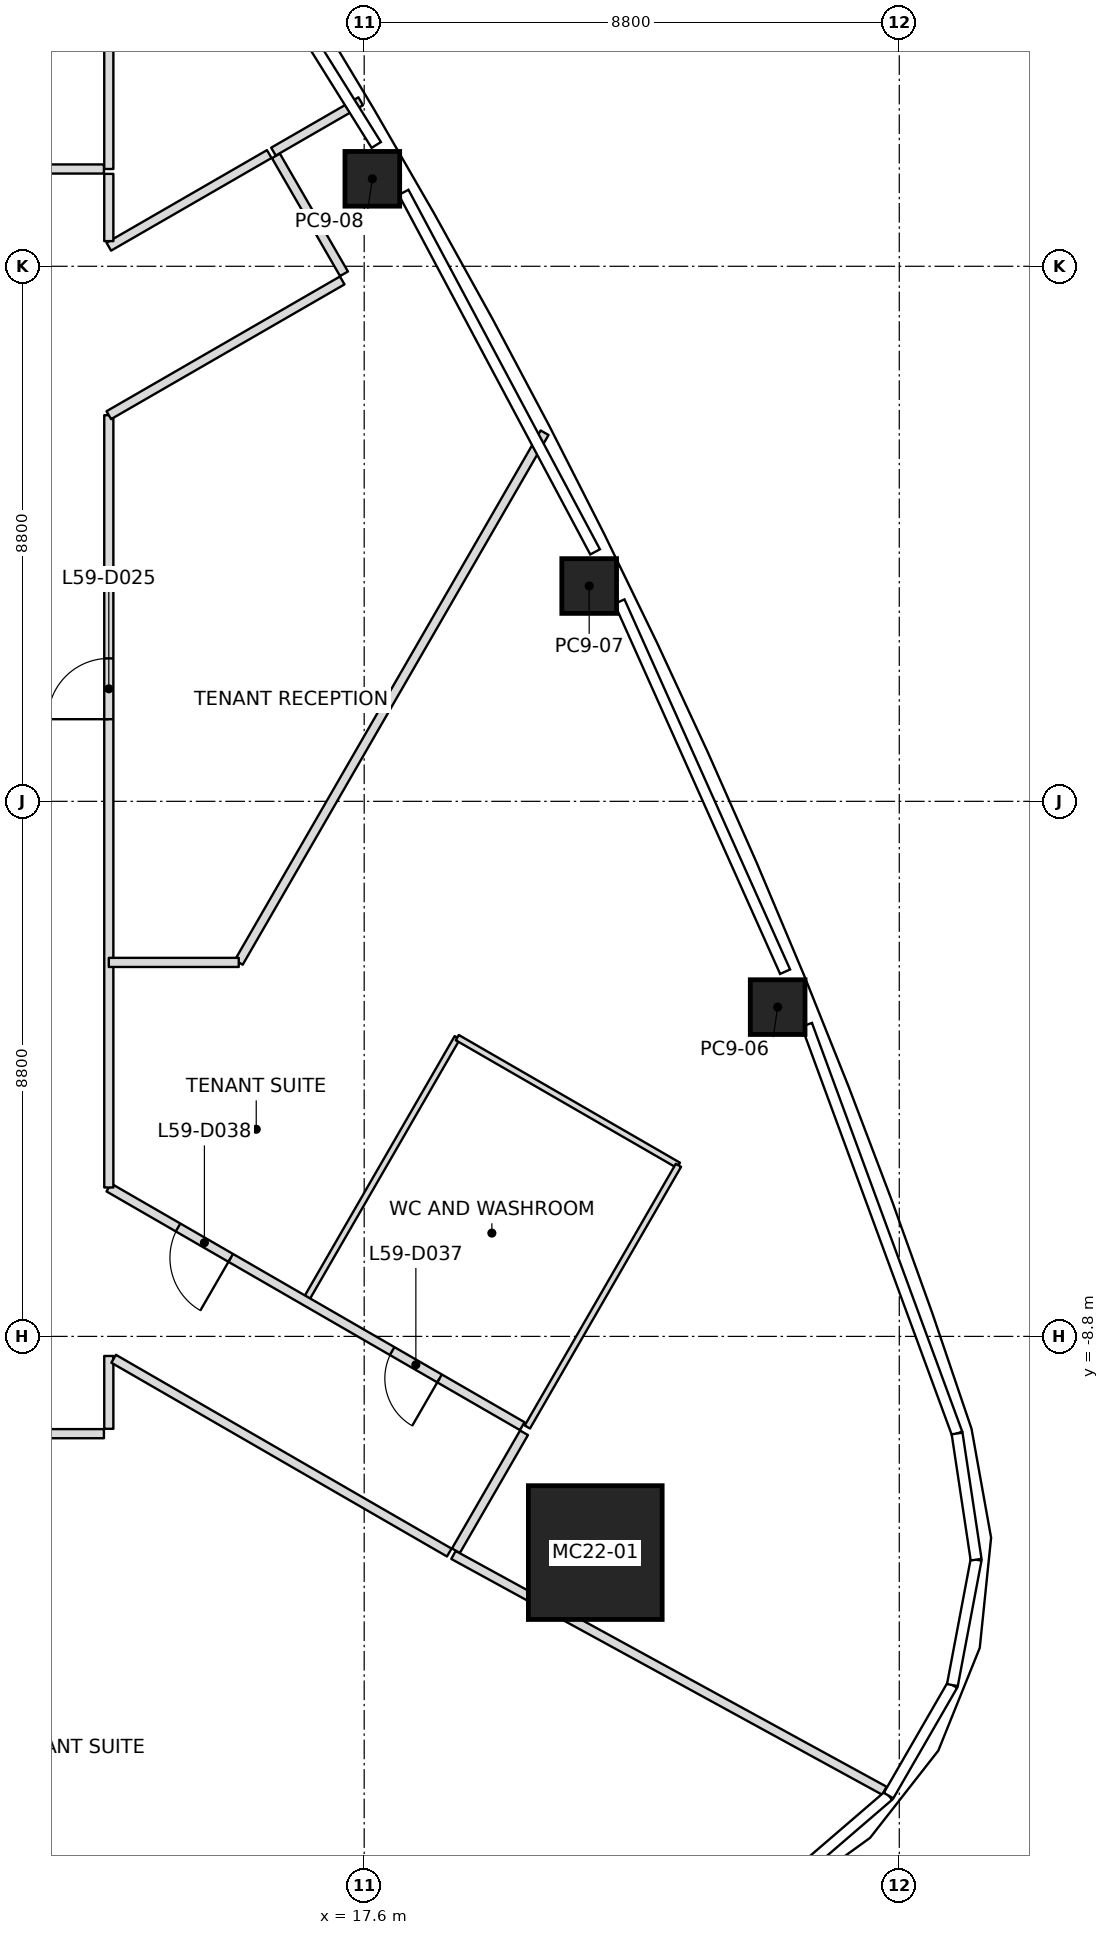
"""IFC4 building model, lengths in metres.
Left out: names, types, materials, properties, quantities, classifications, styles, units other than length and angle.
Written with IfcOpenShell. Run it as: python <this file> out.ifc"""

import sys

from ifc_helpers import new_model, si_unit, direction, frame, frame_2d, origin, origin_2d, place, context, subcontext, project, spatial, rectangle, extrude, element, fill, save


model = new_model("IFC4")
c1 = context("Model", 3, precision=1e-05, world=origin(), true_north=direction((0.0, 1.0)))
c2 = subcontext(c1, "Body", "Model", "MODEL_VIEW")
j1 = project(units=[si_unit("LENGTHUNIT", "METRE"), si_unit("PLANEANGLEUNIT", "RADIAN")], contexts=[c1])
p1 = place(None, origin())
s1 = spatial("IfcSite", under=j1, at=p1, CompositionType="ELEMENT")
p2 = place(p1, origin())
s2 = spatial("IfcBuilding", under=s1, at=p2, CompositionType="ELEMENT")
p3 = place(p2, frame((0.0, 0.0, 263.0)))
s3 = spatial("IfcBuildingStorey", under=s2, at=p3, CompositionType="ELEMENT", Elevation=263.0)
p4 = place(p3, frame((21.4, -12.356, 0.0), z_axis=(-0.027756693063, 0.016104982348, 0.999484965136), x_axis=(0.99961470877, 0.000447193351, 0.02775309042)))
e1 = element("IfcColumn", 1, at=p4, inside=s3, PredefinedType="COLUMN", context=c2, shape_type="SweptSolid", body=[
    extrude(rectangle(XDim=2.2, YDim=2.2, at=origin_2d()), origin(), (0.0, 0.0, 1.0), 4.002),
])
p5 = place(p3, frame((24.4, -3.385, 0.0), z_axis=(-0.017757540332, 0.01000768596, 0.999792236409), x_axis=(-0.376945742216, 0.926097740454, -0.015965041529)))
e2 = element("IfcColumn", 2, at=p5, inside=s3, PredefinedType="COLUMN", context=c2, shape_type="SweptSolid", body=[
    extrude(rectangle(XDim=0.9, YDim=0.9, at=origin_2d()), origin(), (0.0, 0.0, 1.0), 4.001),
])
p6 = place(p3, frame((21.3, 3.541, 0.0), z_axis=(-0.014036674448, 0.002013957638, 0.999899452818), x_axis=(-0.439491445478, 0.898211338571, -0.00797876017)))
e3 = element("IfcColumn", 3, at=p6, inside=s3, PredefinedType="COLUMN", context=c2, shape_type="SweptSolid", body=[
    extrude(rectangle(XDim=0.9, YDim=0.9, at=origin_2d()), origin(), (0.0, 0.0, 1.0), 4.0),
])
p7 = place(p3, frame((17.734, 10.239, 0.0), z_axis=(-0.009887052741, -0.005675900648, 0.999935013058), x_axis=(-0.49997556095, 0.866039512773, -2.7732311e-05)))
e4 = element("IfcColumn", 4, at=p7, inside=s3, PredefinedType="COLUMN", context=c2, shape_type="SweptSolid", body=[
    extrude(rectangle(XDim=0.9, YDim=0.9, at=origin_2d()), origin(), (0.0, 0.0, 1.0), 4.0),
])
p8 = place(p3, frame((13.4, 13.711, 0.0), z_axis=(0.0, 0.0, 1.0), x_axis=(0.0, -1.0, 0.0)))
e5 = element("IfcWall", 5, at=p8, inside=s3, PredefinedType="PARTITIONING", context=c2, shape_type="SweptSolid", body=[
    extrude(rectangle(XDim=3.311, YDim=0.15, at=frame_2d((1.656, 0.0))), origin(), (0.0, 0.0, 1.0), 3.443),
])
p9 = place(p3, frame((20.567, 6.062, 0.0), z_axis=(0.0, 0.0, 1.0), x_axis=(-0.500007469231, -0.866021091379, 0.0)))
e6 = element("IfcWall", 6, at=p9, inside=s3, PredefinedType="PARTITIONING", context=c2, shape_type="SweptSolid", body=[
    extrude(rectangle(XDim=10.059, YDim=0.15, at=frame_2d((5.03, 0.0))), origin(), (0.0, 0.0, 1.0), 3.234),
])
p10 = place(p3, frame((15.537, -2.649, 0.0), z_axis=(0.0, 0.0, 1.0), x_axis=(-1.0, 0.0, 0.0)))
e7 = element("IfcWall", 7, at=p10, inside=s3, PredefinedType="PARTITIONING", context=c2, shape_type="SweptSolid", body=[
    extrude(rectangle(XDim=2.137, YDim=0.15, at=frame_2d((1.069, 0.0))), origin(), (0.0, 0.0, 1.0), 3.317),
])
p11 = place(p3, frame((16.108, 10.686, 0.0), z_axis=(0.0, 0.0, 1.0), x_axis=(0.866057962423, 0.499943602543, 0.0)))
e8 = element("IfcWall", 8, at=p11, inside=s3, PredefinedType="PARTITIONING", context=c2, shape_type="SweptSolid", body=[
    extrude(rectangle(XDim=1.656, YDim=0.15, at=frame_2d((0.828, 0.0))), origin(), (0.0, 0.0, 1.0), 3.234),
])
p12 = place(p3, frame((19.068, -12.395, 0.0), z_axis=(0.0, 0.0, 1.0), x_axis=(0.877283852565, -0.479971917959, 0.0)))
e9 = element("IfcWall", 9, at=p12, inside=s3, PredefinedType="PARTITIONING", context=c2, shape_type="SweptSolid", body=[
    extrude(rectangle(XDim=8.078, YDim=0.15, at=frame_2d((4.039, 0.0))), origin(), (0.0, 0.0, 1.0), 3.234),
])
p13 = place(p3, frame((1.2, -10.4, 0.0), z_axis=(0.0, 0.0, 1.0), x_axis=(1.0, 0.0, 0.0)))
e10 = element("IfcWall", 10, at=p13, inside=s3, PredefinedType="PARTITIONING", context=c2, shape_type="SweptSolid", body=[
    extrude(rectangle(XDim=12.12, YDim=0.15, at=frame_2d((6.06, 0.0))), origin(), (0.0, 0.0, 1.0), 3.317),
])
p14 = place(p13, frame((1.35, 0.0, 0.0)))
e11 = element("IfcOpeningElement", 11, at=p14, cuts=e10, PredefinedType="OPENING", context=c2, shape_type="SweptSolid", body=[
    extrude(rectangle(XDim=0.9, YDim=2.1, at=frame_2d((0.45, 1.05))), frame((0.0, 0.075, 0.0), z_axis=(0.0, -1.0, 0.0), x_axis=(1.0, 0.0, 0.0)), (0.0, 0.0, 1.0), 0.15),
])
p15 = place(p13, frame((7.45, 0.0, 0.0)))
e12 = element("IfcOpeningElement", 12, at=p15, cuts=e10, PredefinedType="OPENING", context=c2, shape_type="SweptSolid", body=[
    extrude(rectangle(XDim=1.0, YDim=2.1, at=frame_2d((0.5, 1.05))), frame((0.0, 0.075, 0.0), z_axis=(0.0, -1.0, 0.0), x_axis=(1.0, 0.0, 0.0)), (0.0, 0.0, 1.0), 0.15),
])
p16 = place(p3, frame((13.32, 10.4, 0.0), z_axis=(0.0, 0.0, 1.0), x_axis=(-1.0, 0.0, 0.0)))
e13 = element("IfcWall", 13, at=p16, inside=s3, PredefinedType="PARTITIONING", context=c2, shape_type="SweptSolid", body=[
    extrude(rectangle(XDim=12.12, YDim=0.15, at=frame_2d((6.06, 0.0))), origin(), (0.0, 0.0, 1.0), 3.443),
])
p17 = place(p16, frame((5.52, 0.0, 0.0)))
e14 = element("IfcOpeningElement", 14, at=p17, cuts=e13, PredefinedType="OPENING", context=c2, shape_type="SweptSolid", body=[
    extrude(rectangle(XDim=1.0, YDim=2.1, at=frame_2d((0.5, 1.05))), frame((0.0, 0.075, 0.0), z_axis=(0.0, -1.0, 0.0), x_axis=(1.0, 0.0, 0.0)), (0.0, 0.0, 1.0), 0.15),
])
p18 = place(p3, frame((13.4, -10.32, 0.0), z_axis=(0.0, 0.0, 1.0), x_axis=(0.0, 1.0, 0.0)))
e15 = element("IfcWall", 15, at=p18, inside=s3, PredefinedType="PARTITIONING", context=c2, shape_type="SweptSolid", body=[
    extrude(rectangle(XDim=1.198, YDim=0.15, at=frame_2d((0.599, 0.0))), origin(), (0.0, 0.0, 1.0), 3.233),
])
p19 = place(p3, frame((13.479, -9.168, 0.0), z_axis=(0.0, 0.0, 1.0), x_axis=(0.866030582615, -0.499991029894, 0.0)))
e16 = element("IfcWall", 16, at=p19, inside=s3, PredefinedType="PARTITIONING", context=c2, shape_type="SweptSolid", body=[
    extrude(rectangle(XDim=6.374, YDim=0.15, at=frame_2d((3.187, 0.0))), origin(), (0.0, 0.0, 1.0), 3.233),
])
p20 = place(p3, frame((16.039, 10.646, 0.0), z_axis=(0.0, 0.0, 1.0), x_axis=(-0.866045493049, -0.499965202759, 0.0)))
e17 = element("IfcWall", 17, at=p20, inside=s3, PredefinedType="PARTITIONING", context=c2, shape_type="SweptSolid", body=[
    extrude(rectangle(XDim=3.047, YDim=0.15, at=frame_2d((1.523, 0.0))), origin(), (0.0, 0.0, 1.0), 3.45),
])
p21 = place(p3, frame((13.4, 9.214, 0.0), z_axis=(0.0, 0.0, 1.0), x_axis=(0.0, 1.0, 0.0)))
e18 = element("IfcWall", 18, at=p21, inside=s3, PredefinedType="PARTITIONING", context=c2, shape_type="SweptSolid", body=[
    extrude(rectangle(XDim=1.106, YDim=0.15, at=frame_2d((0.553, 0.0))), origin(), (0.0, 0.0, 1.0), 3.45),
])
p22 = place(p3, frame((17.268, 8.677, 0.0), z_axis=(0.0, 0.0, 1.0), x_axis=(-0.500077830873, 0.865980463445, 0.0)))
e19 = element("IfcWall", 19, at=p22, inside=s3, PredefinedType="PARTITIONING", context=c2, shape_type="SweptSolid", body=[
    extrude(rectangle(XDim=2.24, YDim=0.15, at=frame_2d((1.12, 0.0))), origin(), (0.0, 0.0, 1.0), 3.45),
])
p23 = place(p3, frame((20.199, -10.276, 0.0), z_axis=(0.0, 0.0, 1.0), x_axis=(-0.866028164062, 0.499995219029, 0.0)))
e20 = element("IfcWall", 20, at=p23, inside=s3, PredefinedType="PARTITIONING", context=c2, shape_type="SweptSolid", body=[
    extrude(rectangle(XDim=7.851, YDim=0.15, at=frame_2d((3.926, 0.0))), origin(), (0.0, 0.0, 1.0), 3.317),
])
p24 = place(p23, frame((1.57, 0.0, 0.0)))
e21 = element("IfcOpeningElement", 21, at=p24, cuts=e20, PredefinedType="OPENING", context=c2, shape_type="SweptSolid", body=[
    extrude(rectangle(XDim=0.9, YDim=2.1, at=frame_2d((0.45, 1.05))), frame((0.0, 0.075, 0.0), z_axis=(0.0, -1.0, 0.0), x_axis=(1.0, 0.0, 0.0)), (0.0, 0.0, 1.0), 0.15),
])
p25 = place(p23, frame((5.535, 0.0, 0.0)))
e22 = element("IfcOpeningElement", 22, at=p25, cuts=e20, PredefinedType="OPENING", context=c2, shape_type="SweptSolid", body=[
    extrude(rectangle(XDim=1.0, YDim=2.1, at=frame_2d((0.5, 1.05))), frame((0.0, 0.075, 0.0), z_axis=(0.0, -1.0, 0.0), x_axis=(1.0, 0.0, 0.0)), (0.0, 0.0, 1.0), 0.15),
])
p26 = place(p3, frame((13.4, -6.351, 0.0), z_axis=(0.0, 0.0, 1.0), x_axis=(0.0, 1.0, 0.0)))
e23 = element("IfcWall", 23, at=p26, inside=s3, PredefinedType="PARTITIONING", context=c2, shape_type="SweptSolid", body=[
    extrude(rectangle(XDim=12.702, YDim=0.15, at=frame_2d((6.351, 0.0))), origin(), (0.0, 0.0, 1.0), 3.317),
])
p27 = place(p26, frame((7.702, 0.0, 0.0)))
e24 = element("IfcOpeningElement", 24, at=p27, cuts=e23, PredefinedType="OPENING", context=c2, shape_type="SweptSolid", body=[
    extrude(rectangle(XDim=1.0, YDim=2.1, at=frame_2d((0.5, 1.05))), frame((0.0, 0.075, 0.0), z_axis=(0.0, -1.0, 0.0), x_axis=(1.0, 0.0, 0.0)), (0.0, 0.0, 1.0), 0.15),
])
p28 = place(p3, frame((13.4, 6.351, 0.0), z_axis=(0.0, 0.0, 1.0), x_axis=(0.866031500321, 0.49998944034, 0.0)))
e25 = element("IfcWall", 25, at=p28, inside=s3, PredefinedType="PARTITIONING", context=c2, shape_type="SweptSolid", body=[
    extrude(rectangle(XDim=4.433, YDim=0.15, at=frame_2d((2.216, 0.0))), origin(), (0.0, 0.0, 1.0), 3.45),
])
p29 = place(p3, frame((19.108, -12.325, 0.0), z_axis=(0.0, 0.0, 1.0), x_axis=(0.500030632641, 0.866007717299, 0.0)))
e26 = element("IfcWall", 26, at=p29, inside=s3, PredefinedType="PARTITIONING", context=c2, shape_type="SweptSolid", body=[
    extrude(rectangle(XDim=2.24, YDim=0.15, at=frame_2d((1.12, 0.0))), origin(), (0.0, 0.0, 1.0), 3.233),
])
p30 = place(p3, frame((16.646, -8.19, 0.0), z_axis=(0.0, 0.0, 1.0), x_axis=(0.500011595943, 0.86601870876, 0.0)))
e27 = element("IfcWall", 27, at=p30, inside=s3, PredefinedType="PARTITIONING", context=c2, shape_type="SweptSolid", body=[
    extrude(rectangle(XDim=4.97, YDim=0.1, at=frame_2d((2.485, 0.0))), origin(), (0.0, 0.0, 1.0), 3.317),
])
p31 = place(p3, frame((19.131, -3.886, 0.0), z_axis=(0.0, 0.0, 1.0), x_axis=(0.866034573852, -0.49998411664, 0.0)))
e28 = element("IfcWall", 28, at=p31, inside=s3, PredefinedType="PARTITIONING", context=c2, shape_type="SweptSolid", body=[
    extrude(rectangle(XDim=4.2, YDim=0.1, at=frame_2d((2.1, 0.0))), origin(), (0.0, 0.0, 1.0), 3.317),
])
p32 = place(p3, frame((22.768, -5.986, 0.0), z_axis=(0.0, 0.0, 1.0), x_axis=(-0.499974753747, -0.866039979225, 0.0)))
e29 = element("IfcWall", 29, at=p32, inside=s3, PredefinedType="PARTITIONING", context=c2, shape_type="SweptSolid", body=[
    extrude(rectangle(XDim=4.97, YDim=0.1, at=frame_2d((2.485, 0.0))), origin(), (0.0, 0.0, 1.0), 3.45),
])
p33 = place(p27, origin())
e30 = element("IfcDoor", 30, at=p33, inside=s3, OperationType="SINGLE_SWING_RIGHT", PredefinedType="DOOR", context=c2, shape_type="SweptSolid", body=[
    extrude(rectangle(XDim=1.0, YDim=2.1, at=frame_2d((0.5, 1.05))), frame((0.0, 0.025, 0.0), z_axis=(0.0, -1.0, 0.0), x_axis=(1.0, 0.0, 0.0)), (0.0, 0.0, 1.0), 0.05),
])
fill(e24, e30)
p34 = place(p24, origin())
e31 = element("IfcDoor", 31, at=p34, inside=s3, OperationType="SINGLE_SWING_LEFT", PredefinedType="DOOR", context=c2, shape_type="SweptSolid", body=[
    extrude(rectangle(XDim=0.9, YDim=2.1, at=frame_2d((0.45, 1.05))), frame((0.0, 0.025, 0.0), z_axis=(0.0, -1.0, 0.0), x_axis=(1.0, 0.0, 0.0)), (0.0, 0.0, 1.0), 0.05),
])
fill(e21, e31)
p35 = place(p25, origin())
e32 = element("IfcDoor", 32, at=p35, inside=s3, OperationType="SINGLE_SWING_LEFT", PredefinedType="DOOR", context=c2, shape_type="SweptSolid", body=[
    extrude(rectangle(XDim=1.0, YDim=2.1, at=frame_2d((0.5, 1.05))), frame((0.0, 0.025, 0.0), z_axis=(0.0, -1.0, 0.0), x_axis=(1.0, 0.0, 0.0)), (0.0, 0.0, 1.0), 0.05),
])
fill(e22, e32)
save(model, sys.argv[1])
